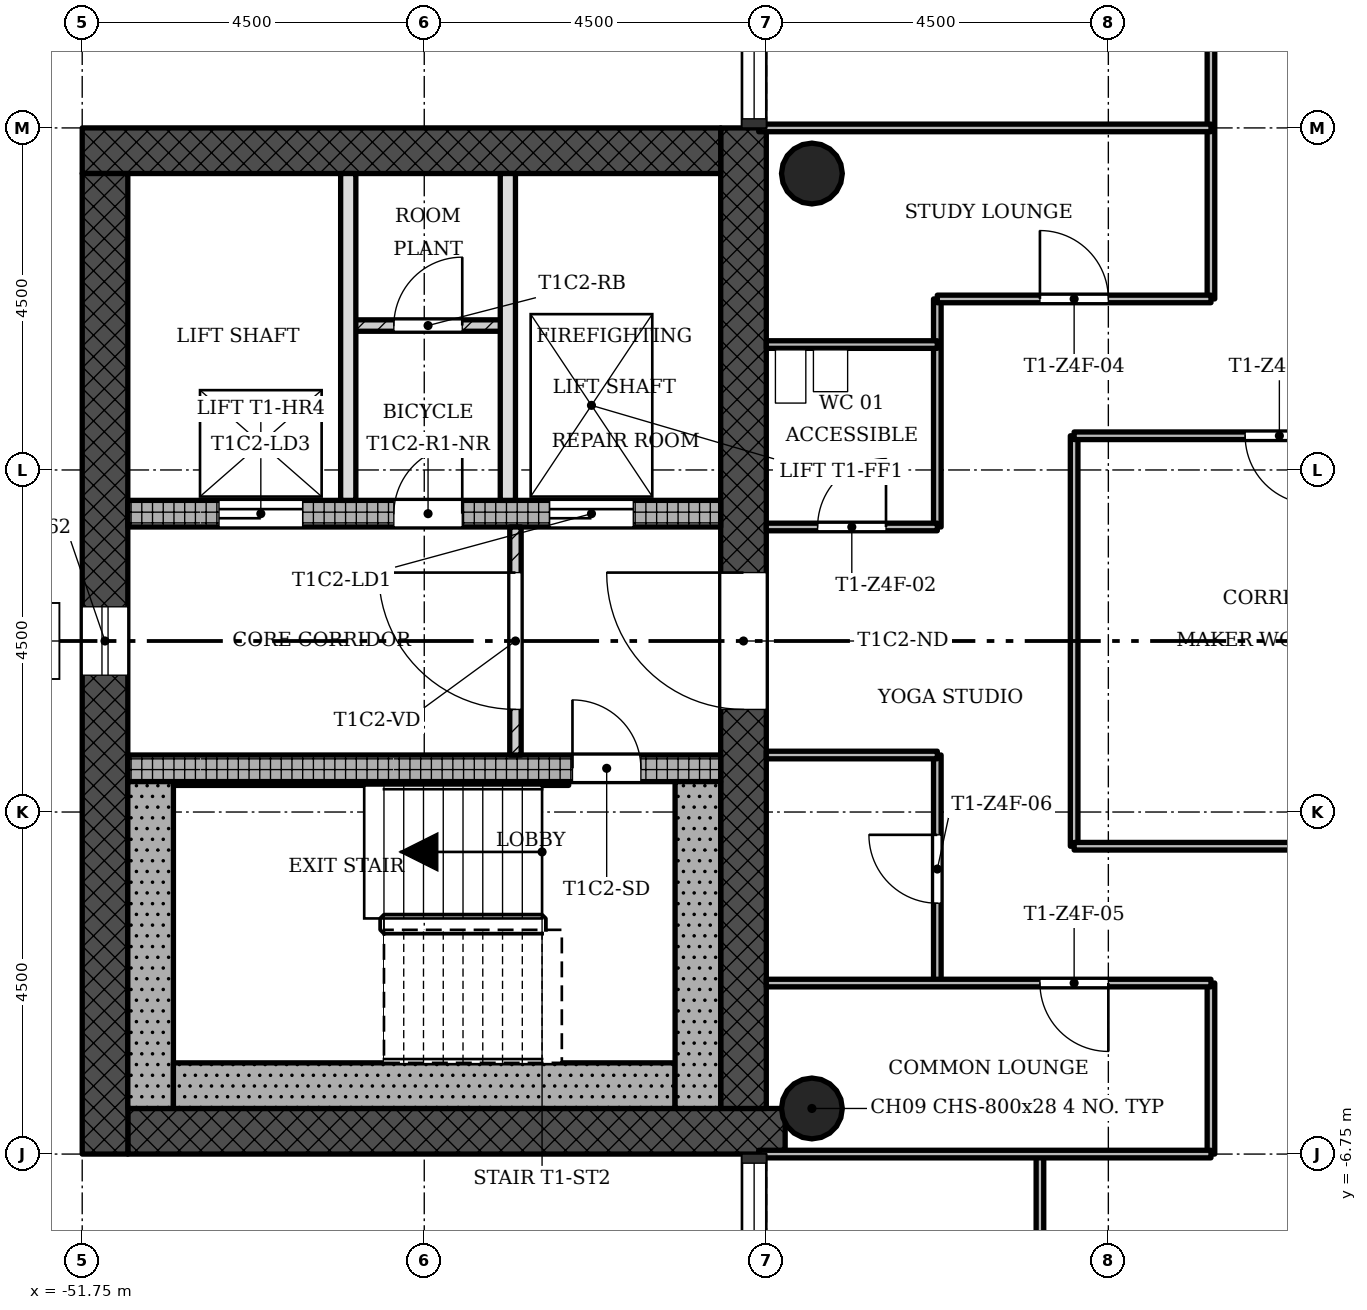
"""IFC4 building model, lengths in metres.
Left out: names, types, materials, properties, quantities, classifications, styles, units other than length and angle.
Written with IfcOpenShell. Run it as: python <this file> out.ifc"""

import sys

from ifc_helpers import new_model, si_unit, direction, frame, frame_2d, origin, origin_2d, place, context, subcontext, project, spatial, rectangle, hollow_circle, extrude, element, fill, save


model = new_model("IFC4")
c1 = context("Model", 3, precision=1e-05, world=origin(), true_north=direction((0.0, 1.0)))
c2 = subcontext(c1, "Body", "Model", "MODEL_VIEW")
j1 = project(units=[si_unit("LENGTHUNIT", "METRE"), si_unit("PLANEANGLEUNIT", "RADIAN")], contexts=[c1])
p1 = place(None, origin())
s1 = spatial("IfcSite", under=j1, at=p1, CompositionType="ELEMENT")
p2 = place(p1, origin())
s2 = spatial("IfcBuilding", under=s1, at=p2, CompositionType="ELEMENT")
p3 = place(p2, frame((0.0, 0.0, 223.2)))
s3 = spatial("IfcBuildingStorey", under=s2, at=p3, CompositionType="ELEMENT", Elevation=223.2)
p4 = place(p3, frame((-51.15, -6.45, 0.0), z_axis=(0.0, 0.0, 1.0), x_axis=(1.0, 0.0, 0.0)))
e1 = element("IfcWall", 1, at=p4, inside=s3, PredefinedType="SHEAR", context=c2, shape_type="SweptSolid", body=[
    extrude(rectangle(XDim=8.648, YDim=0.6, at=frame_2d((4.324, 0.0))), origin(), (0.0, 0.0, 1.0), 3.4),
])
p5 = place(p3, frame((-43.05, -6.15, 0.0), z_axis=(0.0, 0.0, 1.0), x_axis=(0.0, 1.0, 0.0)))
e2 = element("IfcWall", 2, at=p5, inside=s3, PredefinedType="SHEAR", context=c2, shape_type="SweptSolid", body=[
    extrude(rectangle(XDim=12.9, YDim=0.6, at=frame_2d((6.45, 0.0))), origin(), (0.0, 0.0, 1.0), 3.4),
])
p6 = place(p5, frame((5.25, 0.0, 0.0)))
e3 = element("IfcOpeningElement", 3, at=p6, cuts=e2, PredefinedType="OPENING", context=c2, shape_type="SweptSolid", body=[
    extrude(rectangle(XDim=1.8, YDim=2.1, at=frame_2d((0.9, 1.05))), frame((0.0, 0.31, 0.0), z_axis=(0.0, -1.0, 0.0), x_axis=(1.0, 0.0, 0.0)), (0.0, 0.0, 1.0), 0.62),
])
p7 = place(p3, frame((-43.35, 6.45, 0.0), z_axis=(0.0, 0.0, 1.0), x_axis=(-1.0, 0.0, 0.0)))
e4 = element("IfcWall", 4, at=p7, inside=s3, PredefinedType="SHEAR", context=c2, shape_type="SweptSolid", body=[
    extrude(rectangle(XDim=8.4, YDim=0.6, at=frame_2d((4.2, 0.0))), origin(), (0.0, 0.0, 1.0), 3.4),
])
p8 = place(p3, frame((-51.45, 6.15, 0.0), z_axis=(0.0, 0.0, 1.0), x_axis=(0.0, -1.0, 0.0)))
e5 = element("IfcWall", 5, at=p8, inside=s3, PredefinedType="SHEAR", context=c2, shape_type="SweptSolid", body=[
    extrude(rectangle(XDim=12.9, YDim=0.6, at=frame_2d((6.45, 0.0))), origin(), (0.0, 0.0, 1.0), 3.4),
])
p9 = place(p8, frame((5.7, 0.0, 0.45)))
e6 = element("IfcOpeningElement", 6, at=p9, cuts=e5, PredefinedType="OPENING", context=c2, shape_type="SweptSolid", body=[
    extrude(rectangle(XDim=0.9, YDim=2.4, at=frame_2d((0.45, 1.2))), frame((0.0, 0.31, 0.0), z_axis=(0.0, -1.0, 0.0), x_axis=(1.0, 0.0, 0.0)), (0.0, 0.0, 1.0), 0.62),
])
p10 = place(p3, frame((-51.15, -1.675, 0.0), z_axis=(0.0, 0.0, 1.0), x_axis=(1.0, 0.0, 0.0)))
e7 = element("IfcWall", 7, at=p10, inside=s3, PredefinedType="SHEAR", context=c2, shape_type="SweptSolid", body=[
    extrude(rectangle(XDim=7.8, YDim=0.35, at=frame_2d((3.9, 0.0))), origin(), (0.0, 0.0, 1.0), 3.4),
])
p11 = place(p10, frame((5.85, 0.0, 0.0)))
e8 = element("IfcOpeningElement", 8, at=p11, cuts=e7, PredefinedType="OPENING", context=c2, shape_type="SweptSolid", body=[
    extrude(rectangle(XDim=0.9, YDim=2.1, at=frame_2d((0.45, 1.05))), frame((0.0, 0.185, 0.0), z_axis=(0.0, -1.0, 0.0), x_axis=(1.0, 0.0, 0.0)), (0.0, 0.0, 1.0), 0.37),
])
p12 = place(p3, frame((-51.15, 1.675, 0.0), z_axis=(0.0, 0.0, 1.0), x_axis=(1.0, 0.0, 0.0)))
e9 = element("IfcWall", 9, at=p12, inside=s3, PredefinedType="SHEAR", context=c2, shape_type="SweptSolid", body=[
    extrude(rectangle(XDim=7.8, YDim=0.35, at=frame_2d((3.9, 0.0))), origin(), (0.0, 0.0, 1.0), 3.4),
])
p13 = place(p12, frame((5.55, 0.0, 0.0)))
e10 = element("IfcOpeningElement", 10, at=p13, cuts=e9, PredefinedType="OPENING", context=c2, shape_type="SweptSolid", body=[
    extrude(rectangle(XDim=1.1, YDim=2.1, at=frame_2d((0.55, 1.05))), frame((0.0, 0.185, 0.0), z_axis=(0.0, -1.0, 0.0), x_axis=(1.0, 0.0, 0.0)), (0.0, 0.0, 1.0), 0.37),
])
p14 = place(p12, frame((1.2, 0.0, 0.0)))
e11 = element("IfcOpeningElement", 11, at=p14, cuts=e9, PredefinedType="OPENING", context=c2, shape_type="SweptSolid", body=[
    extrude(rectangle(XDim=1.1, YDim=2.1, at=frame_2d((0.55, 1.05))), frame((0.0, 0.185, 0.0), z_axis=(0.0, -1.0, 0.0), x_axis=(1.0, 0.0, 0.0)), (0.0, 0.0, 1.0), 0.37),
])
p15 = place(p12, frame((3.5, 0.0, 0.0)))
e12 = element("IfcOpeningElement", 12, at=p15, cuts=e9, PredefinedType="OPENING", context=c2, shape_type="SweptSolid", body=[
    extrude(rectangle(XDim=0.9, YDim=2.1, at=frame_2d((0.45, 1.05))), frame((0.0, 0.185, 0.0), z_axis=(0.0, -1.0, 0.0), x_axis=(1.0, 0.0, 0.0)), (0.0, 0.0, 1.0), 0.37),
])
for number, where, z_axis, x_axis in (
    (13, (-42.15, -6.15, 0.0), (0.0, 0.0, 1.0), (1.0, 0.0, 0.0)),
    (14, (-42.15, 6.15, 0.0), (0.0, 0.0, 1.0), (1.0, 0.0, 0.0)),
):
    element("IfcColumn", number, at=place(p3, frame(where, z_axis=z_axis, x_axis=x_axis)), inside=s3, PredefinedType="COLUMN", context=c2, shape_type="SweptSolid", body=[
        extrude(hollow_circle(Radius=0.4, WallThickness=0.028, at=origin_2d()), origin(), (0.0, 0.0, 1.0), 3.4),
    ])
p16 = place(p3, frame((-46.05, 1.5, 0.0), z_axis=(0.0, 0.0, 1.0), x_axis=(0.0, -1.0, 0.0)))
e15 = element("IfcWall", 15, at=p16, inside=s3, PredefinedType="PARTITIONING", context=c2, shape_type="SweptSolid", body=[
    extrude(rectangle(XDim=3.0, YDim=0.15, at=frame_2d((1.5, 0.0))), origin(), (0.0, 0.0, 1.0), 3.0),
])
p17 = place(p16, frame((0.6, 0.0, 0.0)))
e16 = element("IfcOpeningElement", 16, at=p17, cuts=e15, PredefinedType="OPENING", context=c2, shape_type="SweptSolid", body=[
    extrude(rectangle(XDim=1.8, YDim=2.1, at=frame_2d((0.9, 1.05))), frame((0.0, 0.085, 0.0), z_axis=(0.0, -1.0, 0.0), x_axis=(1.0, 0.0, 0.0)), (0.0, 0.0, 1.0), 0.17),
])
for number, where, z_axis, x_axis in (
    (17, (-48.25, 6.15, 0.0), (0.0, 0.0, 1.0), (0.0, -1.0, 0.0)),
    (18, (-46.15, 6.15, 0.0), (0.0, 0.0, 1.0), (0.0, -1.0, 0.0)),
):
    element("IfcWall", number, at=place(p3, frame(where, z_axis=z_axis, x_axis=x_axis)), inside=s3, PredefinedType="SOLIDWALL", context=c2, shape_type="SweptSolid", body=[
        extrude(rectangle(XDim=4.3, YDim=0.2, at=frame_2d((2.15, 0.0))), origin(), (0.0, 0.0, 1.0), 3.0),
    ])
p18 = place(p3, frame((-46.15, 4.15, 0.0), z_axis=(0.0, 0.0, 1.0), x_axis=(-1.0, 0.0, 0.0)))
e19 = element("IfcWall", 19, at=p18, inside=s3, PredefinedType="PARTITIONING", context=c2, shape_type="SweptSolid", body=[
    extrude(rectangle(XDim=2.1, YDim=0.15, at=frame_2d((1.05, 0.0))), origin(), (0.0, 0.0, 1.0), 3.0),
])
p19 = place(p18, frame((0.6, 0.0, 0.0)))
e20 = element("IfcOpeningElement", 20, at=p19, cuts=e19, PredefinedType="OPENING", context=c2, shape_type="SweptSolid", body=[
    extrude(rectangle(XDim=0.9, YDim=2.1, at=frame_2d((0.45, 1.05))), frame((0.0, 0.085, 0.0), z_axis=(0.0, -1.0, 0.0), x_axis=(1.0, 0.0, 0.0)), (0.0, 0.0, 1.0), 0.17),
])
p20 = place(p3, frame((-40.5, -4.5, 0.0), z_axis=(0.0, 0.0, 1.0), x_axis=(0.0, 1.0, 0.0)))
e21 = element("IfcWall", 21, at=p20, inside=s3, PredefinedType="PARTITIONING", context=c2, shape_type="SweptSolid", body=[
    extrude(rectangle(XDim=3.0, YDim=0.1, at=frame_2d((1.5, 0.0))), origin(), (0.0, 0.0, 1.0), 3.0),
])
p21 = place(p20, frame((1.05, 0.0, 0.0)))
e22 = element("IfcOpeningElement", 22, at=p21, cuts=e21, PredefinedType="OPENING", context=c2, shape_type="SweptSolid", body=[
    extrude(rectangle(XDim=0.9, YDim=2.1, at=frame_2d((0.45, 1.05))), frame((0.0, 0.06, 0.0), z_axis=(0.0, -1.0, 0.0), x_axis=(1.0, 0.0, 0.0)), (0.0, 0.0, 1.0), 0.12),
])
p22 = place(p3, frame((-40.5, 1.5, 0.0), z_axis=(0.0, 0.0, 1.0), x_axis=(0.0, 1.0, 0.0)))
e23 = element("IfcWall", 23, at=p22, inside=s3, PredefinedType="PARTITIONING", context=c2, shape_type="SweptSolid", body=[
    extrude(rectangle(XDim=3.0, YDim=0.1, at=frame_2d((1.5, 0.0))), origin(), (0.0, 0.0, 1.0), 3.0),
])
p23 = place(p3, frame((-39.15, -11.25, 0.0), z_axis=(0.0, 0.0, 1.0), x_axis=(0.0, 1.0, 0.0)))
e24 = element("IfcWall", 24, at=p23, inside=s3, PredefinedType="PARTITIONING", context=c2, shape_type="SweptSolid", body=[
    extrude(rectangle(XDim=4.5, YDim=0.1, at=frame_2d((2.25, 0.0))), origin(), (0.0, 0.0, 1.0), 3.0),
])
p24 = place(p23, frame((1.8, 0.0, 0.0)))
e25 = element("IfcOpeningElement", 25, at=p24, cuts=e24, PredefinedType="OPENING", context=c2, shape_type="SweptSolid", body=[
    extrude(rectangle(XDim=0.9, YDim=2.1, at=frame_2d((0.45, 1.05))), frame((0.0, 0.06, 0.0), z_axis=(0.0, -1.0, 0.0), x_axis=(1.0, 0.0, 0.0)), (0.0, 0.0, 1.0), 0.12),
])
p25 = place(p3, frame((-38.7, -2.7, 0.0), z_axis=(0.0, 0.0, 1.0), x_axis=(0.0, 1.0, 0.0)))
e26 = element("IfcWall", 26, at=p25, inside=s3, PredefinedType="PARTITIONING", context=c2, shape_type="SweptSolid", body=[
    extrude(rectangle(XDim=5.4, YDim=0.1, at=frame_2d((2.7, 0.0))), origin(), (0.0, 0.0, 1.0), 3.0),
])
p26 = place(p3, frame((-36.9, -6.75, 0.0), z_axis=(0.0, 0.0, 1.0), x_axis=(0.0, 1.0, 0.0)))
e27 = element("IfcWall", 27, at=p26, inside=s3, PredefinedType="PARTITIONING", context=c2, shape_type="SweptSolid", body=[
    extrude(rectangle(XDim=2.25, YDim=0.1, at=frame_2d((1.125, 0.0))), origin(), (0.0, 0.0, 1.0), 3.0),
])
p27 = place(p3, frame((-36.9, 4.5, 0.0), z_axis=(0.0, 0.0, 1.0), x_axis=(0.0, 1.0, 0.0)))
e28 = element("IfcWall", 28, at=p27, inside=s3, PredefinedType="PARTITIONING", context=c2, shape_type="SweptSolid", body=[
    extrude(rectangle(XDim=4.05, YDim=0.1, at=frame_2d((2.025, 0.0))), origin(), (0.0, 0.0, 1.0), 3.0),
])
p28 = place(p3, frame((-42.85, -6.75, 0.0), z_axis=(0.0, 0.0, 1.0), x_axis=(1.0, 0.0, 0.0)))
e29 = element("IfcWall", 29, at=p28, inside=s3, PredefinedType="PARTITIONING", context=c2, shape_type="SweptSolid", body=[
    extrude(rectangle(XDim=5.95, YDim=0.1, at=frame_2d((2.975, 0.0))), origin(), (0.0, 0.0, 1.0), 3.0),
])
p29 = place(p3, frame((-42.75, -4.5, 0.0), z_axis=(0.0, 0.0, 1.0), x_axis=(1.0, 0.0, 0.0)))
e30 = element("IfcWall", 30, at=p29, inside=s3, PredefinedType="PARTITIONING", context=c2, shape_type="SweptSolid", body=[
    extrude(rectangle(XDim=5.85, YDim=0.1, at=frame_2d((2.925, 0.0))), origin(), (0.0, 0.0, 1.0), 3.0),
])
p30 = place(p29, frame((3.6, 0.0, 0.0)))
e31 = element("IfcOpeningElement", 31, at=p30, cuts=e30, PredefinedType="OPENING", context=c2, shape_type="SweptSolid", body=[
    extrude(rectangle(XDim=0.9, YDim=2.1, at=frame_2d((0.45, 1.05))), frame((0.0, 0.06, 0.0), z_axis=(0.0, -1.0, 0.0), x_axis=(1.0, 0.0, 0.0)), (0.0, 0.0, 1.0), 0.12),
])
p31 = place(p3, frame((-38.7, -2.7, 0.0), z_axis=(0.0, 0.0, 1.0), x_axis=(1.0, 0.0, 0.0)))
e32 = element("IfcWall", 32, at=p31, inside=s3, PredefinedType="PARTITIONING", context=c2, shape_type="SweptSolid", body=[
    extrude(rectangle(XDim=5.4, YDim=0.1, at=frame_2d((2.7, 0.0))), origin(), (0.0, 0.0, 1.0), 3.0),
])
p32 = place(p3, frame((-42.75, -1.5, 0.0), z_axis=(0.0, 0.0, 1.0), x_axis=(1.0, 0.0, 0.0)))
e33 = element("IfcWall", 33, at=p32, inside=s3, PredefinedType="PARTITIONING", context=c2, shape_type="SweptSolid", body=[
    extrude(rectangle(XDim=2.25, YDim=0.1, at=frame_2d((1.125, 0.0))), origin(), (0.0, 0.0, 1.0), 3.0),
])
p33 = place(p3, frame((-42.75, 1.5, 0.0), z_axis=(0.0, 0.0, 1.0), x_axis=(1.0, 0.0, 0.0)))
e34 = element("IfcWall", 34, at=p33, inside=s3, PredefinedType="PARTITIONING", context=c2, shape_type="SweptSolid", body=[
    extrude(rectangle(XDim=2.25, YDim=0.1, at=frame_2d((1.125, 0.0))), origin(), (0.0, 0.0, 1.0), 3.0),
])
p34 = place(p33, frame((0.675, 0.0, 0.0)))
e35 = element("IfcOpeningElement", 35, at=p34, cuts=e34, PredefinedType="OPENING", context=c2, shape_type="SweptSolid", body=[
    extrude(rectangle(XDim=0.9, YDim=2.1, at=frame_2d((0.45, 1.05))), frame((0.0, 0.06, 0.0), z_axis=(0.0, -1.0, 0.0), x_axis=(1.0, 0.0, 0.0)), (0.0, 0.0, 1.0), 0.12),
])
p35 = place(p3, frame((-38.7, 2.7, 0.0), z_axis=(0.0, 0.0, 1.0), x_axis=(1.0, 0.0, 0.0)))
e36 = element("IfcWall", 36, at=p35, inside=s3, PredefinedType="PARTITIONING", context=c2, shape_type="SweptSolid", body=[
    extrude(rectangle(XDim=5.4, YDim=0.1, at=frame_2d((2.7, 0.0))), origin(), (0.0, 0.0, 1.0), 3.0),
])
p36 = place(p35, frame((2.25, 0.0, 0.0)))
e37 = element("IfcOpeningElement", 37, at=p36, cuts=e36, PredefinedType="OPENING", context=c2, shape_type="SweptSolid", body=[
    extrude(rectangle(XDim=0.9, YDim=2.1, at=frame_2d((0.45, 1.05))), frame((0.0, 0.06, 0.0), z_axis=(0.0, -1.0, 0.0), x_axis=(1.0, 0.0, 0.0)), (0.0, 0.0, 1.0), 0.12),
])
p37 = place(p3, frame((-42.75, 3.9, 0.0), z_axis=(0.0, 0.0, 1.0), x_axis=(1.0, 0.0, 0.0)))
e38 = element("IfcWall", 38, at=p37, inside=s3, PredefinedType="PARTITIONING", context=c2, shape_type="SweptSolid", body=[
    extrude(rectangle(XDim=2.25, YDim=0.1, at=frame_2d((1.125, 0.0))), origin(), (0.0, 0.0, 1.0), 3.0),
])
p38 = place(p3, frame((-40.5, 4.5, 0.0), z_axis=(0.0, 0.0, 1.0), x_axis=(1.0, 0.0, 0.0)))
e39 = element("IfcWall", 39, at=p38, inside=s3, PredefinedType="PARTITIONING", context=c2, shape_type="SweptSolid", body=[
    extrude(rectangle(XDim=3.6, YDim=0.1, at=frame_2d((1.8, 0.0))), origin(), (0.0, 0.0, 1.0), 3.0),
])
p39 = place(p38, frame((1.35, 0.0, 0.0)))
e40 = element("IfcOpeningElement", 40, at=p39, cuts=e39, PredefinedType="OPENING", context=c2, shape_type="SweptSolid", body=[
    extrude(rectangle(XDim=0.9, YDim=2.1, at=frame_2d((0.45, 1.05))), frame((0.0, 0.06, 0.0), z_axis=(0.0, -1.0, 0.0), x_axis=(1.0, 0.0, 0.0)), (0.0, 0.0, 1.0), 0.12),
])
p40 = place(p3, frame((-42.85, 6.75, 0.0), z_axis=(0.0, 0.0, 1.0), x_axis=(1.0, 0.0, 0.0)))
e41 = element("IfcWall", 41, at=p40, inside=s3, PredefinedType="PARTITIONING", context=c2, shape_type="SweptSolid", body=[
    extrude(rectangle(XDim=5.95, YDim=0.1, at=frame_2d((2.975, 0.0))), origin(), (0.0, 0.0, 1.0), 3.0),
])
p41 = place(p3, frame((-50.85, -1.85, 0.0), z_axis=(0.0, 0.0, 1.0), x_axis=(0.0, -1.0, 0.0)))
e42 = element("IfcWall", 42, at=p41, inside=s3, PredefinedType="SHEAR", context=c2, shape_type="SweptSolid", body=[
    extrude(rectangle(XDim=4.3, YDim=0.6, at=frame_2d((2.15, 0.0))), origin(), (0.0, 0.0, 1.0), 3.4),
])
p42 = place(p3, frame((-43.95, -5.85, 0.0), z_axis=(0.0, 0.0, 1.0), x_axis=(-1.0, 0.0, 0.0)))
e43 = element("IfcWall", 43, at=p42, inside=s3, PredefinedType="SHEAR", context=c2, shape_type="SweptSolid", body=[
    extrude(rectangle(XDim=6.6, YDim=0.6, at=frame_2d((3.3, 0.0))), origin(), (0.0, 0.0, 1.0), 3.4),
])
p43 = place(p3, frame((-43.65, -1.85, 0.0), z_axis=(0.0, 0.0, 1.0), x_axis=(0.0, -1.0, 0.0)))
e44 = element("IfcWall", 44, at=p43, inside=s3, PredefinedType="SHEAR", context=c2, shape_type="SweptSolid", body=[
    extrude(rectangle(XDim=4.3, YDim=0.6, at=frame_2d((2.15, 0.0))), origin(), (0.0, 0.0, 1.0), 3.4),
])
p44 = place(p3, frame((-45.35, -1.875, 0.0), z_axis=(0.0, 0.0, 1.0), x_axis=(-1.0, 0.0, 0.0)))
e45 = element("IfcWall", 45, at=p44, inside=s3, PredefinedType="SHEAR", context=c2, shape_type="SweptSolid", body=[
    extrude(rectangle(XDim=5.2, YDim=0.05, at=frame_2d((2.6, 0.0))), origin(), (0.0, 0.0, 1.0), 3.4),
])
p45 = place(p9, origin())
e46 = element("IfcWindow", 46, at=p45, inside=s3, PartitioningType="SINGLE_PANEL", PredefinedType="WINDOW", context=c2, shape_type="SweptSolid", body=[
    extrude(rectangle(XDim=0.9, YDim=2.4, at=frame_2d((0.45, 1.2))), frame((0.0, 0.03, 0.0), z_axis=(0.0, -1.0, 0.0), x_axis=(1.0, 0.0, 0.0)), (0.0, 0.0, 1.0), 0.06),
])
fill(e6, e46)
p46 = place(p17, origin())
e47 = element("IfcDoor", 47, at=p46, inside=s3, OperationType="SINGLE_SWING_LEFT", PredefinedType="DOOR", context=c2, shape_type="SweptSolid", body=[
    extrude(rectangle(XDim=1.8, YDim=2.1, at=frame_2d((0.9, 1.05))), frame((0.0, 0.025, 0.0), z_axis=(0.0, -1.0, 0.0), x_axis=(1.0, 0.0, 0.0)), (0.0, 0.0, 1.0), 0.05),
])
fill(e16, e47)
p47 = place(p19, origin())
e48 = element("IfcDoor", 48, at=p47, inside=s3, OperationType="SINGLE_SWING_LEFT", PredefinedType="DOOR", context=c2, shape_type="SweptSolid", body=[
    extrude(rectangle(XDim=0.9, YDim=2.1, at=frame_2d((0.45, 1.05))), frame((0.0, 0.025, 0.0), z_axis=(0.0, -1.0, 0.0), x_axis=(1.0, 0.0, 0.0)), (0.0, 0.0, 1.0), 0.05),
])
fill(e20, e48)
p48 = place(p36, origin())
e49 = element("IfcDoor", 49, at=p48, inside=s3, OperationType="SINGLE_SWING_RIGHT", PredefinedType="DOOR", context=c2, shape_type="SweptSolid", body=[
    extrude(rectangle(XDim=0.9, YDim=2.1, at=frame_2d((0.45, 1.05))), frame((0.0, 0.025, 0.0), z_axis=(0.0, -1.0, 0.0), x_axis=(1.0, 0.0, 0.0)), (0.0, 0.0, 1.0), 0.05),
])
fill(e37, e49)
p49 = place(p34, origin())
e50 = element("IfcDoor", 50, at=p49, inside=s3, OperationType="SINGLE_SWING_LEFT", PredefinedType="DOOR", context=c2, shape_type="SweptSolid", body=[
    extrude(rectangle(XDim=0.9, YDim=2.1, at=frame_2d((0.45, 1.05))), frame((0.0, 0.025, 0.0), z_axis=(0.0, -1.0, 0.0), x_axis=(1.0, 0.0, 0.0)), (0.0, 0.0, 1.0), 0.05),
])
fill(e35, e50)
p50 = place(p39, origin())
e51 = element("IfcDoor", 51, at=p50, inside=s3, OperationType="SINGLE_SWING_RIGHT", PredefinedType="DOOR", context=c2, shape_type="SweptSolid", body=[
    extrude(rectangle(XDim=0.9, YDim=2.1, at=frame_2d((0.45, 1.05))), frame((0.0, 0.025, 0.0), z_axis=(0.0, -1.0, 0.0), x_axis=(1.0, 0.0, 0.0)), (0.0, 0.0, 1.0), 0.05),
])
fill(e40, e51)
p51 = place(p30, origin())
e52 = element("IfcDoor", 52, at=p51, inside=s3, OperationType="SINGLE_SWING_RIGHT", PredefinedType="DOOR", context=c2, shape_type="SweptSolid", body=[
    extrude(rectangle(XDim=0.9, YDim=2.1, at=frame_2d((0.45, 1.05))), frame((0.0, 0.025, 0.0), z_axis=(0.0, -1.0, 0.0), x_axis=(1.0, 0.0, 0.0)), (0.0, 0.0, 1.0), 0.05),
])
fill(e31, e52)
p52 = place(p21, origin())
e53 = element("IfcDoor", 53, at=p52, inside=s3, OperationType="SINGLE_SWING_LEFT", PredefinedType="DOOR", context=c2, shape_type="SweptSolid", body=[
    extrude(rectangle(XDim=0.9, YDim=2.1, at=frame_2d((0.45, 1.05))), frame((0.0, 0.025, 0.0), z_axis=(0.0, -1.0, 0.0), x_axis=(1.0, 0.0, 0.0)), (0.0, 0.0, 1.0), 0.05),
])
fill(e22, e53)
p53 = place(p11, origin())
e54 = element("IfcDoor", 54, at=p53, inside=s3, OperationType="SINGLE_SWING_RIGHT", PredefinedType="DOOR", context=c2, shape_type="SweptSolid", body=[
    extrude(rectangle(XDim=0.9, YDim=2.1, at=frame_2d((0.45, 1.05))), frame((0.0, 0.025, 0.0), z_axis=(0.0, -1.0, 0.0), x_axis=(1.0, 0.0, 0.0)), (0.0, 0.0, 1.0), 0.05),
])
fill(e8, e54)
p54 = place(p13, origin())
e55 = element("IfcDoor", 55, at=p54, inside=s3, OperationType="SLIDING_TO_LEFT", PredefinedType="DOOR", context=c2, shape_type="SweptSolid", body=[
    extrude(rectangle(XDim=1.1, YDim=2.1, at=frame_2d((0.55, 1.05))), frame((0.0, 0.025, 0.0), z_axis=(0.0, -1.0, 0.0), x_axis=(1.0, 0.0, 0.0)), (0.0, 0.0, 1.0), 0.05),
])
fill(e10, e55)
p55 = place(p14, origin())
e56 = element("IfcDoor", 56, at=p55, inside=s3, OperationType="SLIDING_TO_LEFT", PredefinedType="DOOR", context=c2, shape_type="SweptSolid", body=[
    extrude(rectangle(XDim=1.1, YDim=2.1, at=frame_2d((0.55, 1.05))), frame((0.0, 0.025, 0.0), z_axis=(0.0, -1.0, 0.0), x_axis=(1.0, 0.0, 0.0)), (0.0, 0.0, 1.0), 0.05),
])
fill(e11, e56)
p56 = place(p15, origin())
e57 = element("IfcDoor", 57, at=p56, inside=s3, OperationType="SINGLE_SWING_LEFT", PredefinedType="DOOR", context=c2, shape_type="SweptSolid", body=[
    extrude(rectangle(XDim=0.9, YDim=2.1, at=frame_2d((0.45, 1.05))), frame((0.0, 0.025, 0.0), z_axis=(0.0, -1.0, 0.0), x_axis=(1.0, 0.0, 0.0)), (0.0, 0.0, 1.0), 0.05),
])
fill(e12, e57)
p57 = place(p6, origin())
e58 = element("IfcDoor", 58, at=p57, inside=s3, OperationType="SINGLE_SWING_LEFT", PredefinedType="DOOR", context=c2, shape_type="SweptSolid", body=[
    extrude(rectangle(XDim=1.8, YDim=2.1, at=frame_2d((0.9, 1.05))), frame((0.0, 0.025, 0.0), z_axis=(0.0, -1.0, 0.0), x_axis=(1.0, 0.0, 0.0)), (0.0, 0.0, 1.0), 0.05),
])
fill(e3, e58)
save(model, sys.argv[1])
